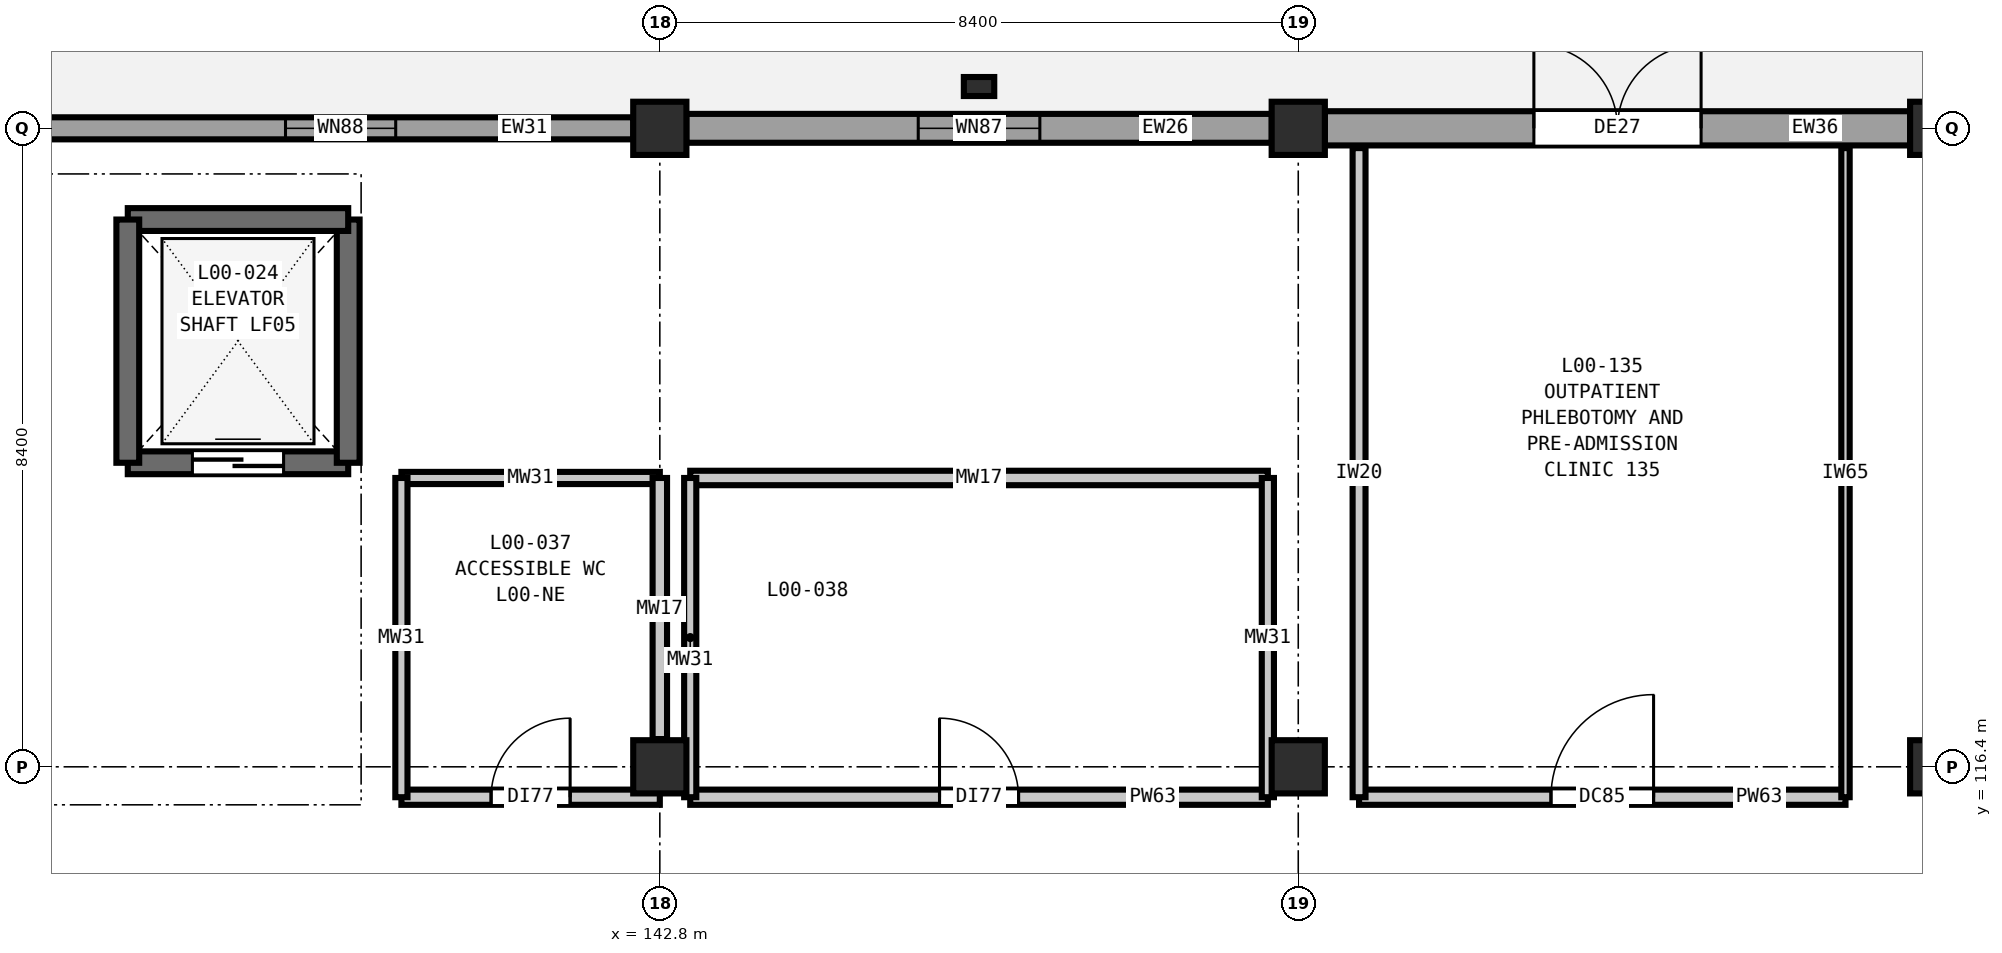
"""IFC4 building model, lengths in metres.
Left out: names, types, materials, properties, quantities, classifications, styles, units other than length and angle.
Written with IfcOpenShell. Run it as: python <this file> out.ifc"""

import sys

from ifc_helpers import new_model, si_unit, direction, frame, frame_2d, origin, origin_2d, place, context, subcontext, project, spatial, rectangle, extrude, element, fill, save


model = new_model("IFC4")
c1 = context("Model", 3, precision=1e-05, world=origin(), true_north=direction((0.0, 1.0)))
c2 = subcontext(c1, "Body", "Model", "MODEL_VIEW")
j1 = project(units=[si_unit("LENGTHUNIT", "METRE"), si_unit("PLANEANGLEUNIT", "RADIAN")], contexts=[c1])
p1 = place(None, origin())
s1 = spatial("IfcSite", under=j1, at=p1, CompositionType="ELEMENT")
p2 = place(p1, origin())
s2 = spatial("IfcBuilding", under=s1, at=p2, CompositionType="ELEMENT")
p3 = place(p2, origin())
s3 = spatial("IfcBuildingStorey", under=s2, at=p3, CompositionType="ELEMENT", Elevation=0.0)
for number, where, z_axis, x_axis in (
    (1, (142.8, 116.4, 0.0), (0.0, 0.0, 1.0), (1.0, 0.0, 0.0)),
    (2, (142.8, 124.8, 0.0), (0.0, 0.0, 1.0), (1.0, 0.0, 0.0)),
    (3, (151.2, 116.4, 0.0), (0.0, 0.0, 1.0), (1.0, 0.0, 0.0)),
    (4, (151.2, 124.8, 0.0), (0.0, 0.0, 1.0), (1.0, 0.0, 0.0)),
    (5, (159.6, 116.4, 0.0), (0.0, 0.0, 1.0), (1.0, 0.0, 0.0)),
    (6, (159.6, 124.8, 0.0), (0.0, 0.0, 1.0), (1.0, 0.0, 0.0)),
):
    element("IfcColumn", number, at=place(p3, frame(where, z_axis=z_axis, x_axis=x_axis)), inside=s3, PredefinedType="COLUMN", context=c2, shape_type="SweptSolid", body=[
        extrude(rectangle(XDim=0.7, YDim=0.7, at=origin_2d()), origin(), (0.0, 0.0, 1.0), 5.4),
    ])
p4 = place(p3, frame((147.0, 125.35, 0.0), z_axis=(0.0, 0.0, 1.0), x_axis=(1.0, 0.0, 0.0)))
e7 = element("IfcColumn", 7, at=p4, inside=s3, PredefinedType="PILASTER", context=c2, shape_type="SweptSolid", body=[
    extrude(rectangle(XDim=0.4, YDim=0.25, at=origin_2d()), origin(), (0.0, 0.0, 1.0), 5.4),
])
p5 = place(p3, frame((134.748, 124.8, 0.0), z_axis=(0.0, 0.0, 1.0), x_axis=(1.0, 0.0, 0.0)))
e8 = element("IfcWall", 8, at=p5, inside=s3, PredefinedType="SOLIDWALL", context=c2, shape_type="SweptSolid", body=[
    extrude(rectangle(XDim=7.704, YDim=0.29, at=frame_2d((3.852, 0.0))), origin(), (0.0, 0.0, 1.0), 4.68),
])
p6 = place(p5, frame((3.127, 0.0, 0.9)))
e9 = element("IfcOpeningElement", 9, at=p6, cuts=e8, PredefinedType="OPENING", context=c2, shape_type="SweptSolid", body=[
    extrude(rectangle(XDim=1.45, YDim=1.75, at=frame_2d((0.725, 0.875))), frame((0.0, 0.155, 0.0), z_axis=(0.0, -1.0, 0.0), x_axis=(1.0, 0.0, 0.0)), (0.0, 0.0, 1.0), 0.31),
])
p7 = place(p3, frame((143.148, 124.8, 0.0), z_axis=(0.0, 0.0, 1.0), x_axis=(1.0, 0.0, 0.0)))
e10 = element("IfcWall", 10, at=p7, inside=s3, PredefinedType="SOLIDWALL", context=c2, shape_type="SweptSolid", body=[
    extrude(rectangle(XDim=7.704, YDim=0.38, at=frame_2d((3.852, 0.0))), origin(), (0.0, 0.0, 1.0), 4.68),
])
p8 = place(p7, frame((3.052, 0.0, 0.9)))
e11 = element("IfcOpeningElement", 11, at=p8, cuts=e10, PredefinedType="OPENING", context=c2, shape_type="SweptSolid", body=[
    extrude(rectangle(XDim=1.6, YDim=1.75, at=frame_2d((0.8, 0.875))), frame((0.0, 0.2, 0.0), z_axis=(0.0, -1.0, 0.0), x_axis=(1.0, 0.0, 0.0)), (0.0, 0.0, 1.0), 0.4),
])
p9 = place(p3, frame((151.548, 124.8, 0.0), z_axis=(0.0, 0.0, 1.0), x_axis=(1.0, 0.0, 0.0)))
e12 = element("IfcWall", 12, at=p9, inside=s3, PredefinedType="SOLIDWALL", context=c2, shape_type="SweptSolid", body=[
    extrude(rectangle(XDim=7.704, YDim=0.45, at=frame_2d((3.852, 0.0))), origin(), (0.0, 0.0, 1.0), 4.68),
])
p10 = place(p9, frame((2.752, 0.0, 0.0)))
e13 = element("IfcOpeningElement", 13, at=p10, cuts=e12, PredefinedType="OPENING", context=c2, shape_type="SweptSolid", body=[
    extrude(rectangle(XDim=2.2, YDim=2.4, at=frame_2d((1.1, 1.2))), frame((0.0, 0.235, 0.0), z_axis=(0.0, -1.0, 0.0), x_axis=(1.0, 0.0, 0.0)), (0.0, 0.0, 1.0), 0.47),
])
p11 = place(p3, frame((135.8, 120.4, 0.0), z_axis=(0.0, 0.0, 1.0), x_axis=(1.0, 0.0, 0.0)))
e14 = element("IfcWall", 14, at=p11, inside=s3, PredefinedType="SHEAR", context=c2, shape_type="SweptSolid", body=[
    extrude(rectangle(XDim=2.9, YDim=0.3, at=frame_2d((1.45, 0.0))), origin(), (0.0, 0.0, 1.0), 5.4),
])
p12 = place(p11, frame((0.85, 0.0, 0.0)))
e15 = element("IfcOpeningElement", 15, at=p12, cuts=e14, PredefinedType="OPENING", context=c2, shape_type="SweptSolid", body=[
    extrude(rectangle(XDim=1.2, YDim=2.2, at=frame_2d((0.6, 1.1))), frame((0.0, 0.16, 0.0), z_axis=(0.0, -1.0, 0.0), x_axis=(1.0, 0.0, 0.0)), (0.0, 0.0, 1.0), 0.32),
])
p13 = place(p3, frame((138.7, 120.4, 0.0), z_axis=(0.0, 0.0, 1.0), x_axis=(0.0, 1.0, 0.0)))
e16 = element("IfcWall", 16, at=p13, inside=s3, PredefinedType="SHEAR", context=c2, shape_type="SweptSolid", body=[
    extrude(rectangle(XDim=3.2, YDim=0.3, at=frame_2d((1.6, 0.0))), origin(), (0.0, 0.0, 1.0), 5.4),
])
p14 = place(p3, frame((138.7, 123.6, 0.0), z_axis=(0.0, 0.0, 1.0), x_axis=(-1.0, 0.0, 0.0)))
e17 = element("IfcWall", 17, at=p14, inside=s3, PredefinedType="SHEAR", context=c2, shape_type="SweptSolid", body=[
    extrude(rectangle(XDim=2.9, YDim=0.3, at=frame_2d((1.45, 0.0))), origin(), (0.0, 0.0, 1.0), 5.4),
])
p15 = place(p3, frame((135.8, 123.6, 0.0), z_axis=(0.0, 0.0, 1.0), x_axis=(0.0, -1.0, 0.0)))
e18 = element("IfcWall", 18, at=p15, inside=s3, PredefinedType="SHEAR", context=c2, shape_type="SweptSolid", body=[
    extrude(rectangle(XDim=3.2, YDim=0.3, at=frame_2d((1.6, 0.0))), origin(), (0.0, 0.0, 1.0), 5.4),
])
p16 = place(p3, frame((139.4, 116.0, 0.0), z_axis=(0.0, 0.0, 1.0), x_axis=(1.0, 0.0, 0.0)))
e19 = element("IfcWall", 19, at=p16, inside=s3, PredefinedType="PARTITIONING", context=c2, shape_type="SweptSolid", body=[
    extrude(rectangle(XDim=3.4, YDim=0.2, at=frame_2d((1.7, 0.0))), origin(), (0.0, 0.0, 1.0), 5.04),
])
p17 = place(p16, frame((1.18, 0.0, 0.0)))
e20 = element("IfcOpeningElement", 20, at=p17, cuts=e19, PredefinedType="OPENING", context=c2, shape_type="SweptSolid", body=[
    extrude(rectangle(XDim=1.04, YDim=2.1, at=frame_2d((0.52, 1.05))), frame((0.0, 0.11, 0.0), z_axis=(0.0, -1.0, 0.0), x_axis=(1.0, 0.0, 0.0)), (0.0, 0.0, 1.0), 0.22),
])
p18 = place(p3, frame((143.2, 116.0, 0.0), z_axis=(0.0, 0.0, 1.0), x_axis=(1.0, 0.0, 0.0)))
e21 = element("IfcWall", 21, at=p18, inside=s3, PredefinedType="PARTITIONING", context=c2, shape_type="SweptSolid", body=[
    extrude(rectangle(XDim=7.6, YDim=0.2, at=frame_2d((3.8, 0.0))), origin(), (0.0, 0.0, 1.0), 5.04),
])
p19 = place(p18, frame((3.28, 0.0, 0.0)))
e22 = element("IfcOpeningElement", 22, at=p19, cuts=e21, PredefinedType="OPENING", context=c2, shape_type="SweptSolid", body=[
    extrude(rectangle(XDim=1.04, YDim=2.1, at=frame_2d((0.52, 1.05))), frame((0.0, 0.11, 0.0), z_axis=(0.0, -1.0, 0.0), x_axis=(1.0, 0.0, 0.0)), (0.0, 0.0, 1.0), 0.22),
])
p20 = place(p3, frame((152.0, 116.0, 0.0), z_axis=(0.0, 0.0, 1.0), x_axis=(1.0, 0.0, 0.0)))
e23 = element("IfcWall", 23, at=p20, inside=s3, PredefinedType="PARTITIONING", context=c2, shape_type="SweptSolid", body=[
    extrude(rectangle(XDim=6.4, YDim=0.2, at=frame_2d((3.2, 0.0))), origin(), (0.0, 0.0, 1.0), 5.04),
])
p21 = place(p20, frame((2.525, 0.0, 0.0)))
e24 = element("IfcOpeningElement", 24, at=p21, cuts=e23, PredefinedType="OPENING", context=c2, shape_type="SweptSolid", body=[
    extrude(rectangle(XDim=1.35, YDim=2.2, at=frame_2d((0.675, 1.1))), frame((0.0, 0.11, 0.0), z_axis=(0.0, -1.0, 0.0), x_axis=(1.0, 0.0, 0.0)), (0.0, 0.0, 1.0), 0.22),
])
p22 = place(p3, frame((139.4, 120.2, 0.0), z_axis=(0.0, 0.0, 1.0), x_axis=(1.0, 0.0, 0.0)))
e25 = element("IfcWall", 25, at=p22, inside=s3, PredefinedType="PLUMBINGWALL", context=c2, shape_type="SweptSolid", body=[
    extrude(rectangle(XDim=3.4, YDim=0.16, at=frame_2d((1.7, 0.0))), origin(), (0.0, 0.0, 1.0), 5.04),
])
p23 = place(p3, frame((143.2, 120.2, 0.0), z_axis=(0.0, 0.0, 1.0), x_axis=(1.0, 0.0, 0.0)))
e26 = element("IfcWall", 26, at=p23, inside=s3, PredefinedType="PLUMBINGWALL", context=c2, shape_type="SweptSolid", body=[
    extrude(rectangle(XDim=7.6, YDim=0.19, at=frame_2d((3.8, 0.0))), origin(), (0.0, 0.0, 1.0), 5.04),
])
p24 = place(p3, frame((139.4, 116.0, 0.0), z_axis=(0.0, 0.0, 1.0), x_axis=(0.0, 1.0, 0.0)))
e27 = element("IfcWall", 27, at=p24, inside=s3, PredefinedType="PLUMBINGWALL", context=c2, shape_type="SweptSolid", body=[
    extrude(rectangle(XDim=4.2, YDim=0.16, at=frame_2d((2.1, 0.0))), origin(), (0.0, 0.0, 1.0), 5.04),
])
p25 = place(p3, frame((142.8, 116.765, 0.0), z_axis=(0.0, 0.0, 1.0), x_axis=(0.0, 1.0, 0.0)))
e28 = element("IfcWall", 28, at=p25, inside=s3, PredefinedType="PLUMBINGWALL", context=c2, shape_type="SweptSolid", body=[
    extrude(rectangle(XDim=3.435, YDim=0.19, at=frame_2d((1.718, 0.0))), origin(), (0.0, 0.0, 1.0), 4.685),
])
for number, where, z_axis, x_axis in (
    (29, (143.2, 116.0, 0.0), (0.0, 0.0, 1.0), (0.0, 1.0, 0.0)),
    (30, (150.8, 116.0, 0.0), (0.0, 0.0, 1.0), (0.0, 1.0, 0.0)),
):
    element("IfcWall", number, at=place(p3, frame(where, z_axis=z_axis, x_axis=x_axis)), inside=s3, PredefinedType="PLUMBINGWALL", context=c2, shape_type="SweptSolid", body=[
        extrude(rectangle(XDim=4.2, YDim=0.16, at=frame_2d((2.1, 0.0))), origin(), (0.0, 0.0, 1.0), 5.04),
    ])
p26 = place(p3, frame((152.0, 116.0, 0.0), z_axis=(0.0, 0.0, 1.0), x_axis=(0.0, 1.0, 0.0)))
e31 = element("IfcWall", 31, at=p26, inside=s3, PredefinedType="PARTITIONING", context=c2, shape_type="SweptSolid", body=[
    extrude(rectangle(XDim=8.54, YDim=0.17, at=frame_2d((4.27, 0.0))), origin(), (0.0, 0.0, 1.0), 5.04),
])
p27 = place(p3, frame((158.4, 116.0, 0.0), z_axis=(0.0, 0.0, 1.0), x_axis=(0.0, 1.0, 0.0)))
e32 = element("IfcWall", 32, at=p27, inside=s3, PredefinedType="PARTITIONING", context=c2, shape_type="SweptSolid", body=[
    extrude(rectangle(XDim=8.54, YDim=0.11, at=frame_2d((4.27, 0.0))), origin(), (0.0, 0.0, 1.0), 5.04),
])
p28 = place(p6, origin())
e33 = element("IfcWindow", 33, at=p28, inside=s3, PartitioningType="SINGLE_PANEL", PredefinedType="WINDOW", context=c2, shape_type="SweptSolid", body=[
    extrude(rectangle(XDim=1.45, YDim=1.75, at=frame_2d((0.725, 0.875))), frame((0.0, 0.03, 0.0), z_axis=(0.0, -1.0, 0.0), x_axis=(1.0, 0.0, 0.0)), (0.0, 0.0, 1.0), 0.06),
])
fill(e9, e33)
p29 = place(p8, origin())
e34 = element("IfcWindow", 34, at=p29, inside=s3, PartitioningType="DOUBLE_PANEL_VERTICAL", PredefinedType="WINDOW", context=c2, shape_type="SweptSolid", body=[
    extrude(rectangle(XDim=1.6, YDim=1.75, at=frame_2d((0.8, 0.875))), frame((0.0, 0.03, 0.0), z_axis=(0.0, -1.0, 0.0), x_axis=(1.0, 0.0, 0.0)), (0.0, 0.0, 1.0), 0.06),
])
fill(e11, e34)
p30 = place(p10, origin())
e35 = element("IfcDoor", 35, at=p30, inside=s3, OperationType="DOUBLE_DOOR_SINGLE_SWING", PredefinedType="DOOR", context=c2, shape_type="SweptSolid", body=[
    extrude(rectangle(XDim=2.2, YDim=2.4, at=frame_2d((1.1, 1.2))), frame((0.0, 0.025, 0.0), z_axis=(0.0, -1.0, 0.0), x_axis=(1.0, 0.0, 0.0)), (0.0, 0.0, 1.0), 0.05),
])
fill(e13, e35)
p31 = place(p12, origin())
e36 = element("IfcDoor", 36, at=p31, inside=s3, OperationType="DOUBLE_DOOR_SLIDING", PredefinedType="DOOR", context=c2, shape_type="SweptSolid", body=[
    extrude(rectangle(XDim=1.2, YDim=2.2, at=frame_2d((0.6, 1.1))), frame((0.0, 0.025, 0.0), z_axis=(0.0, -1.0, 0.0), x_axis=(1.0, 0.0, 0.0)), (0.0, 0.0, 1.0), 0.05),
])
fill(e15, e36)
p32 = place(p17, origin())
e37 = element("IfcDoor", 37, at=p32, inside=s3, OperationType="SINGLE_SWING_RIGHT", PredefinedType="DOOR", context=c2, shape_type="SweptSolid", body=[
    extrude(rectangle(XDim=1.04, YDim=2.1, at=frame_2d((0.52, 1.05))), frame((0.0, 0.025, 0.0), z_axis=(0.0, -1.0, 0.0), x_axis=(1.0, 0.0, 0.0)), (0.0, 0.0, 1.0), 0.05),
])
fill(e20, e37)
p33 = place(p19, origin())
e38 = element("IfcDoor", 38, at=p33, inside=s3, OperationType="SINGLE_SWING_LEFT", PredefinedType="DOOR", context=c2, shape_type="SweptSolid", body=[
    extrude(rectangle(XDim=1.04, YDim=2.1, at=frame_2d((0.52, 1.05))), frame((0.0, 0.025, 0.0), z_axis=(0.0, -1.0, 0.0), x_axis=(1.0, 0.0, 0.0)), (0.0, 0.0, 1.0), 0.05),
])
fill(e22, e38)
p34 = place(p21, origin())
e39 = element("IfcDoor", 39, at=p34, inside=s3, OperationType="SINGLE_SWING_RIGHT", PredefinedType="DOOR", context=c2, shape_type="SweptSolid", body=[
    extrude(rectangle(XDim=1.35, YDim=2.2, at=frame_2d((0.675, 1.1))), frame((0.0, 0.025, 0.0), z_axis=(0.0, -1.0, 0.0), x_axis=(1.0, 0.0, 0.0)), (0.0, 0.0, 1.0), 0.05),
])
fill(e24, e39)
save(model, sys.argv[1])
